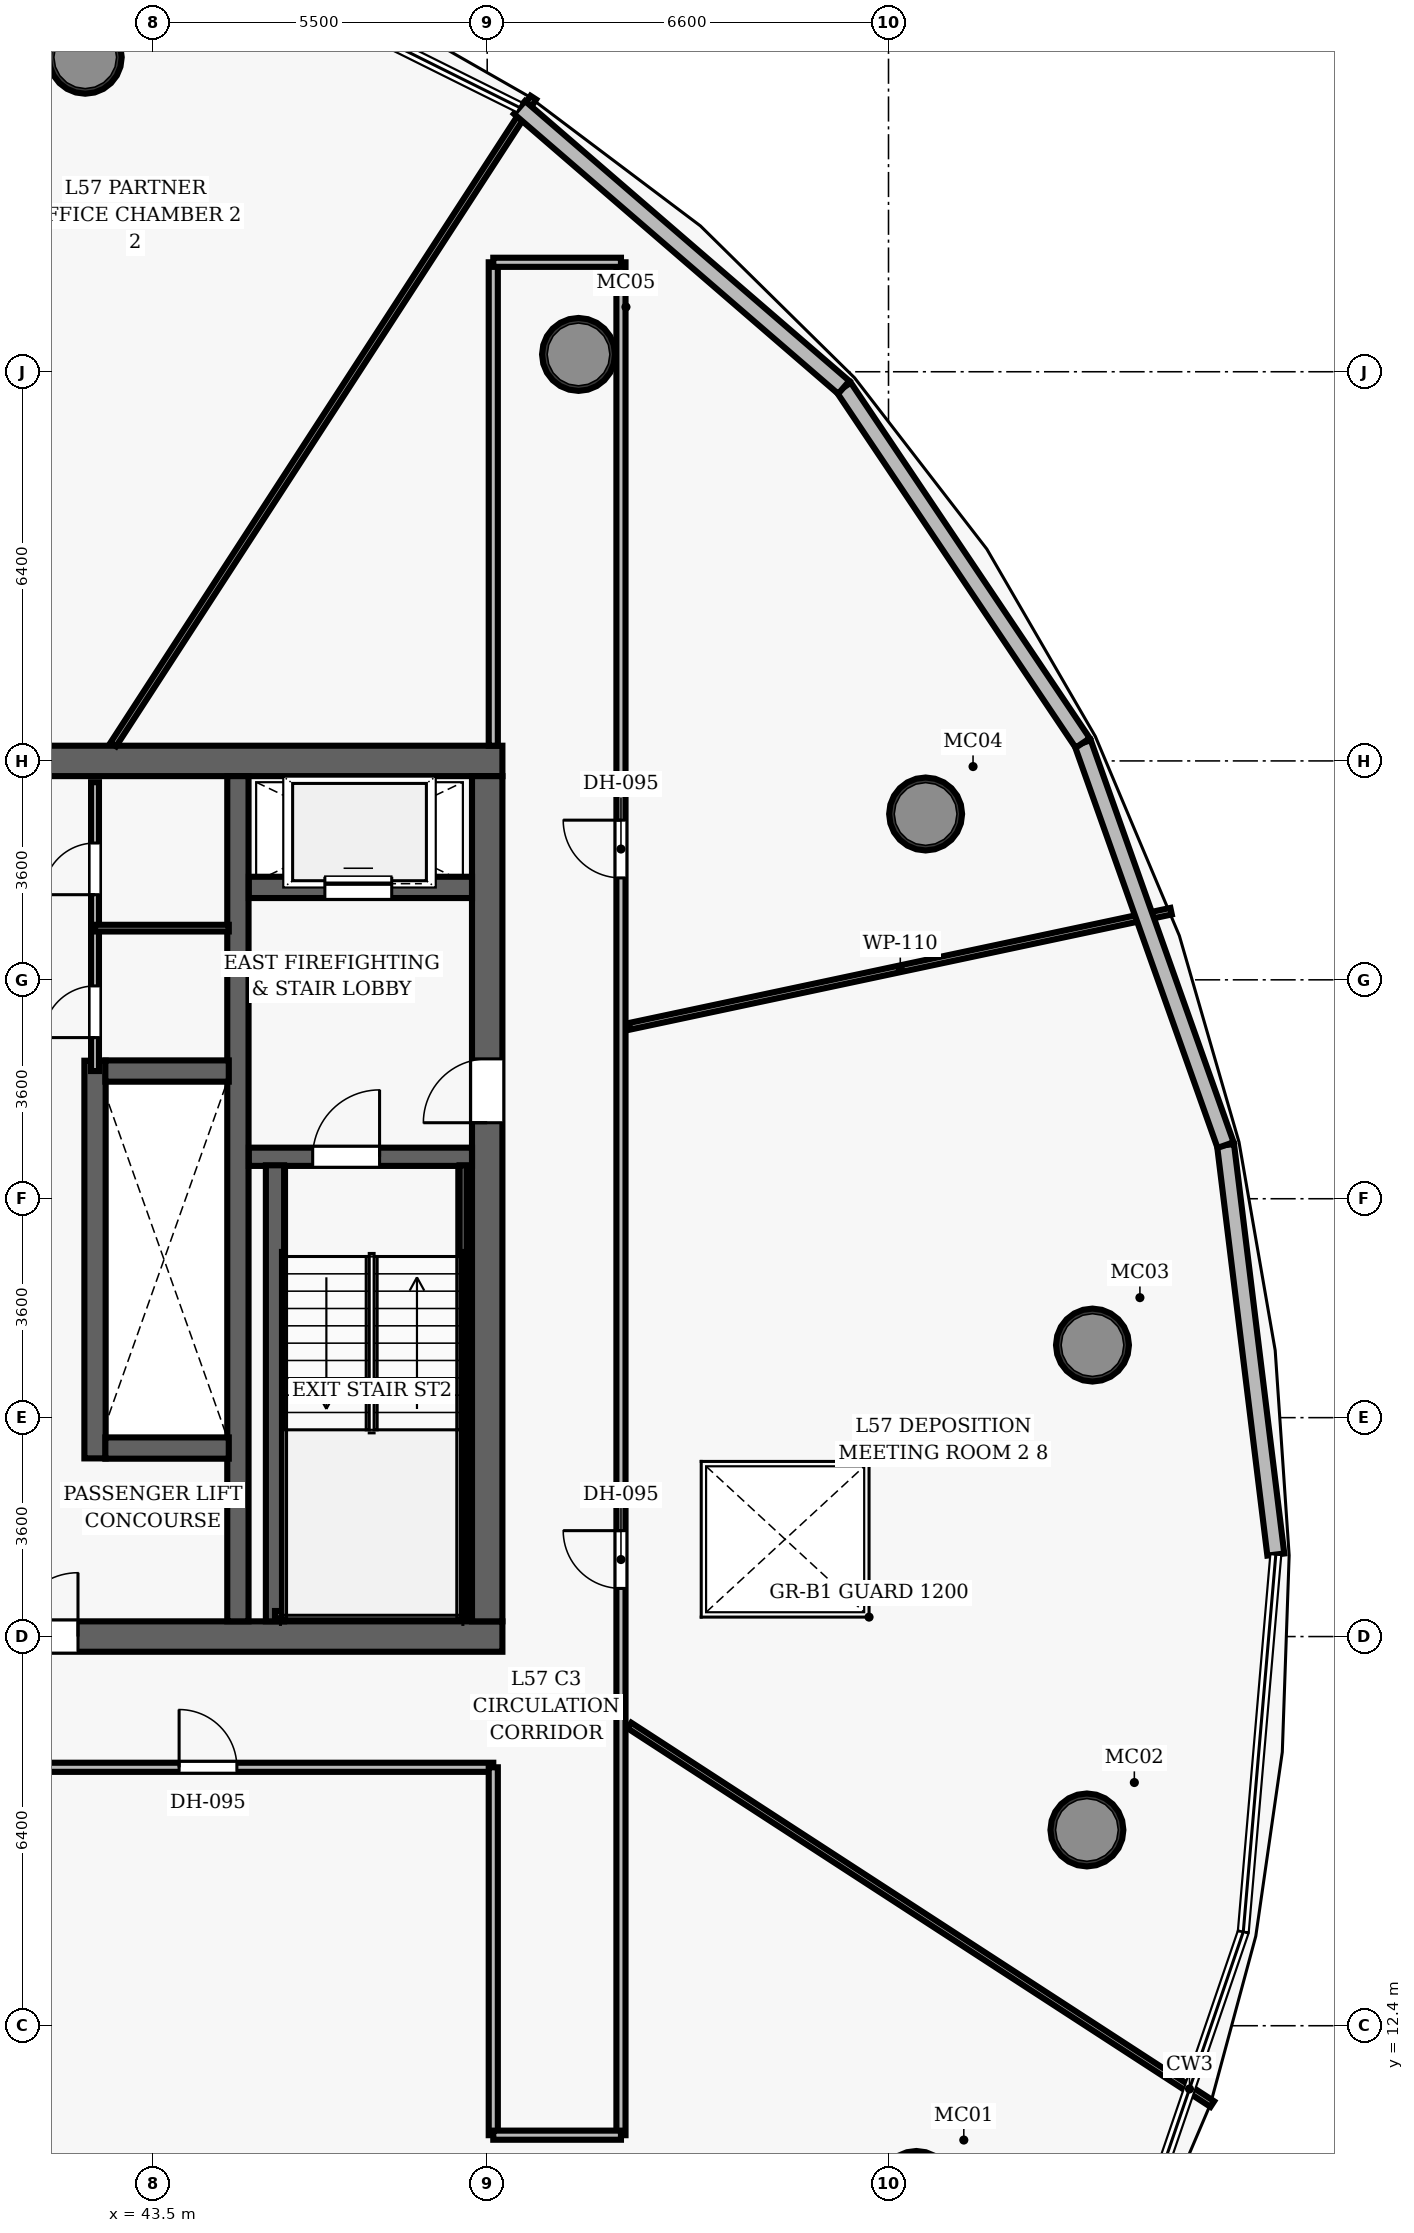
"""IFC4 building model, lengths in metres.
Left out: names, types, materials, properties, quantities, classifications, styles, units other than length and angle.
Written with IfcOpenShell. Run it as: python <this file> out.ifc"""

import sys

from ifc_helpers import new_model, si_unit, direction, frame, frame_2d, origin, origin_2d, place, context, subcontext, project, spatial, rectangle, hollow_circle, extrude, element, fill, save


model = new_model("IFC4")
c1 = context("Model", 3, precision=1e-05, world=origin(), true_north=direction((0.0, 1.0)))
c2 = subcontext(c1, "Body", "Model", "MODEL_VIEW")
j1 = project(units=[si_unit("LENGTHUNIT", "METRE"), si_unit("PLANEANGLEUNIT", "RADIAN")], contexts=[c1])
p1 = place(None, origin())
s1 = spatial("IfcSite", under=j1, at=p1, CompositionType="ELEMENT")
p2 = place(p1, origin())
s2 = spatial("IfcBuilding", under=s1, at=p2, CompositionType="ELEMENT")
p3 = place(p2, frame((0.0, 0.0, 225.1)))
s3 = spatial("IfcBuildingStorey", under=s2, at=p3, CompositionType="ELEMENT", Elevation=225.1)
p4 = place(p3, frame((26.75, 18.8, 0.0), z_axis=(0.0, 0.0, 1.0), x_axis=(1.0, 0.0, 0.0)))
e1 = element("IfcWall", 1, at=p4, inside=s3, PredefinedType="SHEAR", context=c2, shape_type="SweptSolid", body=[
    extrude(rectangle(XDim=22.5, YDim=0.5, at=frame_2d((11.25, 0.0))), origin(), (0.0, 0.0, 1.0), 3.85),
])
p5 = place(p4, frame((14.47, 0.0, 0.0)))
e2 = element("IfcOpeningElement", 2, at=p5, cuts=e1, PredefinedType="OPENING", context=c2, shape_type="SweptSolid", body=[
    extrude(rectangle(XDim=1.05, YDim=2.15, at=frame_2d((0.525, 1.075))), frame((0.0, 0.26, 0.0), z_axis=(0.0, -1.0, 0.0), x_axis=(1.0, 0.0, 0.0)), (0.0, 0.0, 1.0), 0.52),
])
p6 = place(p3, frame((26.75, 33.2, 0.0), z_axis=(0.0, 0.0, 1.0), x_axis=(1.0, 0.0, 0.0)))
e3 = element("IfcWall", 3, at=p6, inside=s3, PredefinedType="SHEAR", context=c2, shape_type="SweptSolid", body=[
    extrude(rectangle(XDim=22.5, YDim=0.5, at=frame_2d((11.25, 0.0))), origin(), (0.0, 0.0, 1.0), 3.85),
])
p7 = place(p3, frame((49.0, 19.05, 0.0), z_axis=(0.0, 0.0, 1.0), x_axis=(0.0, 1.0, 0.0)))
e4 = element("IfcWall", 4, at=p7, inside=s3, PredefinedType="SHEAR", context=c2, shape_type="SweptSolid", body=[
    extrude(rectangle(XDim=13.9, YDim=0.5, at=frame_2d((6.95, 0.0))), origin(), (0.0, 0.0, 1.0), 3.85),
])
p8 = place(p7, frame((8.2, 0.0, 0.0)))
e5 = element("IfcOpeningElement", 5, at=p8, cuts=e4, PredefinedType="OPENING", context=c2, shape_type="SweptSolid", body=[
    extrude(rectangle(XDim=1.05, YDim=2.15, at=frame_2d((0.525, 1.075))), frame((0.0, 0.26, 0.0), z_axis=(0.0, -1.0, 0.0), x_axis=(1.0, 0.0, 0.0)), (0.0, 0.0, 1.0), 0.52),
])
p9 = place(p3, frame((44.9, 19.05, 0.0), z_axis=(0.0, 0.0, 1.0), x_axis=(0.0, 1.0, 0.0)))
e6 = element("IfcWall", 6, at=p9, inside=s3, PredefinedType="SHEAR", context=c2, shape_type="SweptSolid", body=[
    extrude(rectangle(XDim=13.9, YDim=0.35, at=frame_2d((6.95, 0.0))), origin(), (0.0, 0.0, 1.0), 3.85),
])
for number, where, z_axis, x_axis in (
    (7, (56.058, 9.74, 0.0), (0.0, 0.0, 1.0), (1.0, 0.0, 0.0)),
    (8, (58.863, 15.619, 0.0), (0.0, 0.0, 1.0), (1.0, 0.0, 0.0)),
    (9, (58.955, 23.594, 0.0), (0.0, 0.0, 1.0), (1.0, 0.0, 0.0)),
    (10, (56.21, 32.327, 0.0), (0.0, 0.0, 1.0), (1.0, 0.0, 0.0)),
    (11, (50.502, 39.885, 0.0), (0.0, 0.0, 1.0), (1.0, 0.0, 0.0)),
    (12, (42.389, 44.772, 0.0), (0.0, 0.0, 1.0), (1.0, 0.0, 0.0)),
):
    element("IfcColumn", number, at=place(p3, frame(where, z_axis=z_axis, x_axis=x_axis)), inside=s3, PredefinedType="COLUMN", context=c2, shape_type="SweptSolid", body=[
        extrude(hollow_circle(Radius=0.6, WallThickness=0.05, at=origin_2d()), origin(), (0.0, 0.0, 1.0), 3.85),
    ])
p10 = place(p3, frame((45.08, 26.69, 0.0), z_axis=(0.0, 0.0, 1.0), x_axis=(1.0, 0.0, 0.0)))
e13 = element("IfcWall", 13, at=p10, inside=s3, PredefinedType="SHEAR", context=c2, shape_type="SweptSolid", body=[
    extrude(rectangle(XDim=3.67, YDim=0.3, at=frame_2d((1.835, 0.0))), origin(), (0.0, 0.0, 1.0), 3.85),
])
p11 = place(p10, frame((1.05, 0.0, 0.0)))
e14 = element("IfcOpeningElement", 14, at=p11, cuts=e13, PredefinedType="OPENING", context=c2, shape_type="SweptSolid", body=[
    extrude(rectangle(XDim=1.1, YDim=2.15, at=frame_2d((0.55, 1.075))), frame((0.0, 0.16, 0.0), z_axis=(0.0, -1.0, 0.0), x_axis=(1.0, 0.0, 0.0)), (0.0, 0.0, 1.0), 0.32),
])
p12 = place(p3, frame((45.51, 19.05, 0.0), z_axis=(0.0, 0.0, 1.0), x_axis=(0.0, 1.0, 0.0)))
e15 = element("IfcWall", 15, at=p12, inside=s3, PredefinedType="SHEAR", context=c2, shape_type="SweptSolid", body=[
    extrude(rectangle(XDim=7.5, YDim=0.3, at=frame_2d((3.75, 0.0))), origin(), (0.0, 0.0, 1.0), 3.85),
])
p13 = place(p3, frame((48.605, 19.1, 0.0), z_axis=(0.0, 0.0, 1.0), x_axis=(0.0, 1.0, 0.0)))
e16 = element("IfcWall", 16, at=p13, inside=s3, PredefinedType="SHEAR", context=c2, shape_type="SweptSolid", body=[
    extrude(rectangle(XDim=7.45, YDim=0.12, at=frame_2d((3.725, 0.0))), origin(), (0.0, 0.0, 1.0), 3.85),
])
p14 = place(p3, frame((45.51, 19.16, 0.0), z_axis=(0.0, 0.0, 1.0), x_axis=(1.0, 0.0, 0.0)))
e17 = element("IfcWall", 17, at=p14, inside=s3, PredefinedType="SHEAR", context=c2, shape_type="SweptSolid", body=[
    extrude(rectangle(XDim=3.095, YDim=0.12, at=frame_2d((1.547, 0.0))), origin(), (0.0, 0.0, 1.0), 3.85),
])
p15 = place(p3, frame((45.08, 31.12, 0.0), z_axis=(0.0, 0.0, 1.0), x_axis=(1.0, 0.0, 0.0)))
e18 = element("IfcWall", 18, at=p15, inside=s3, PredefinedType="SHEAR", context=c2, shape_type="SweptSolid", body=[
    extrude(rectangle(XDim=3.67, YDim=0.35, at=frame_2d((1.835, 0.0))), origin(), (0.0, 0.0, 1.0), 3.035),
])
p16 = place(p15, frame((1.25, 0.0, 0.0)))
e19 = element("IfcOpeningElement", 19, at=p16, cuts=e18, PredefinedType="OPENING", context=c2, shape_type="SweptSolid", body=[
    extrude(rectangle(XDim=1.1, YDim=2.15, at=frame_2d((0.55, 1.075))), frame((0.0, 0.185, 0.0), z_axis=(0.0, -1.0, 0.0), x_axis=(1.0, 0.0, 0.0)), (0.0, 0.0, 1.0), 0.37),
])
p17 = place(p3, frame((42.55, 21.73, 0.0), z_axis=(0.0, 0.0, 1.0), x_axis=(0.0, 1.0, 0.0)))
e20 = element("IfcWall", 20, at=p17, inside=s3, PredefinedType="SHEAR", context=c2, shape_type="SweptSolid", body=[
    extrude(rectangle(XDim=6.54, YDim=0.35, at=frame_2d((3.27, 0.0))), origin(), (0.0, 0.0, 1.0), 3.035),
])
for number, where, z_axis, x_axis in (
    (21, (42.72, 21.9, 0.0), (0.0, 0.0, 1.0), (1.0, 0.0, 0.0)),
    (22, (42.72, 28.1, 0.0), (0.0, 0.0, 1.0), (1.0, 0.0, 0.0)),
):
    element("IfcWall", number, at=place(p3, frame(where, z_axis=z_axis, x_axis=x_axis)), inside=s3, PredefinedType="SHEAR", context=c2, shape_type="SweptSolid", body=[
        extrude(rectangle(XDim=2.03, YDim=0.35, at=frame_2d((1.015, 0.0))), origin(), (0.0, 0.0, 1.0), 3.035),
    ])
p18 = place(p3, frame((42.55, 28.1, 0.0), z_axis=(0.0, 0.0, 1.0), x_axis=(0.0, 1.0, 0.0)))
e23 = element("IfcWall", 23, at=p18, inside=s3, PredefinedType="PARTITIONING", context=c2, shape_type="SweptSolid", body=[
    extrude(rectangle(XDim=4.75, YDim=0.13, at=frame_2d((2.375, 0.0))), origin(), (0.0, 0.0, 1.0), 3.035),
])
p19 = place(p18, frame((0.55, 0.0, 0.0)))
e24 = element("IfcOpeningElement", 24, at=p19, cuts=e23, PredefinedType="OPENING", context=c2, shape_type="SweptSolid", body=[
    extrude(rectangle(XDim=0.85, YDim=2.1, at=frame_2d((0.425, 1.05))), frame((0.0, 0.075, 0.0), z_axis=(0.0, -1.0, 0.0), x_axis=(1.0, 0.0, 0.0)), (0.0, 0.0, 1.0), 0.15),
])
p20 = place(p18, frame((2.9, 0.0, 0.0)))
e25 = element("IfcOpeningElement", 25, at=p20, cuts=e23, PredefinedType="OPENING", context=c2, shape_type="SweptSolid", body=[
    extrude(rectangle(XDim=0.85, YDim=2.1, at=frame_2d((0.425, 1.05))), frame((0.0, 0.075, 0.0), z_axis=(0.0, -1.0, 0.0), x_axis=(1.0, 0.0, 0.0)), (0.0, 0.0, 1.0), 0.15),
])
p21 = place(p3, frame((42.55, 30.45, 0.0), z_axis=(0.0, 0.0, 1.0), x_axis=(1.0, 0.0, 0.0)))
e26 = element("IfcWall", 26, at=p21, inside=s3, PredefinedType="PARTITIONING", context=c2, shape_type="SweptSolid", body=[
    extrude(rectangle(XDim=2.2, YDim=0.11, at=frame_2d((1.1, 0.0))), origin(), (0.0, 0.0, 1.0), 3.035),
])
p22 = place(p3, frame((26.9, 16.65, 0.0), z_axis=(0.0, 0.0, 1.0), x_axis=(1.0, 0.0, 0.0)))
e27 = element("IfcWall", 27, at=p22, inside=s3, PredefinedType="PARTITIONING", context=c2, shape_type="SweptSolid", body=[
    extrude(rectangle(XDim=22.2, YDim=0.15, at=frame_2d((11.1, 0.0))), origin(), (0.0, 0.0, 1.0), 3.035),
])
p23 = place(p22, frame((10.744, 0.0, 0.0)))
e28 = element("IfcOpeningElement", 28, at=p23, cuts=e27, PredefinedType="OPENING", context=c2, shape_type="SweptSolid", body=[
    extrude(rectangle(XDim=0.95, YDim=2.15, at=frame_2d((0.475, 1.075))), frame((0.0, 0.085, 0.0), z_axis=(0.0, -1.0, 0.0), x_axis=(1.0, 0.0, 0.0)), (0.0, 0.0, 1.0), 0.17),
])
p24 = place(p22, frame((17.033, 0.0, 0.0)))
e29 = element("IfcOpeningElement", 29, at=p24, cuts=e27, PredefinedType="OPENING", context=c2, shape_type="SweptSolid", body=[
    extrude(rectangle(XDim=0.95, YDim=2.15, at=frame_2d((0.475, 1.075))), frame((0.0, 0.085, 0.0), z_axis=(0.0, -1.0, 0.0), x_axis=(1.0, 0.0, 0.0)), (0.0, 0.0, 1.0), 0.17),
])
p25 = place(p3, frame((51.2, 10.6, 0.0), z_axis=(0.0, 0.0, 1.0), x_axis=(0.0, 1.0, 0.0)))
e30 = element("IfcWall", 30, at=p25, inside=s3, PredefinedType="PARTITIONING", context=c2, shape_type="SweptSolid", body=[
    extrude(rectangle(XDim=30.8, YDim=0.15, at=frame_2d((15.4, 0.0))), origin(), (0.0, 0.0, 1.0), 3.035),
])
p26 = place(p25, frame((20.676, 0.0, 0.0)))
e31 = element("IfcOpeningElement", 31, at=p26, cuts=e30, PredefinedType="OPENING", context=c2, shape_type="SweptSolid", body=[
    extrude(rectangle(XDim=0.95, YDim=2.15, at=frame_2d((0.475, 1.075))), frame((0.0, 0.085, 0.0), z_axis=(0.0, -1.0, 0.0), x_axis=(1.0, 0.0, 0.0)), (0.0, 0.0, 1.0), 0.17),
])
p27 = place(p25, frame((8.992, 0.0, 0.0)))
e32 = element("IfcOpeningElement", 32, at=p27, cuts=e30, PredefinedType="OPENING", context=c2, shape_type="SweptSolid", body=[
    extrude(rectangle(XDim=0.95, YDim=2.15, at=frame_2d((0.475, 1.075))), frame((0.0, 0.085, 0.0), z_axis=(0.0, -1.0, 0.0), x_axis=(1.0, 0.0, 0.0)), (0.0, 0.0, 1.0), 0.17),
])
p28 = place(p3, frame((49.1, 10.6, 0.0), z_axis=(0.0, 0.0, 1.0), x_axis=(0.0, 1.0, 0.0)))
e33 = element("IfcWall", 33, at=p28, inside=s3, PredefinedType="PARTITIONING", context=c2, shape_type="SweptSolid", body=[
    extrude(rectangle(XDim=6.05, YDim=0.15, at=frame_2d((3.025, 0.0))), origin(), (0.0, 0.0, 1.0), 3.035),
])
p29 = place(p3, frame((49.1, 33.45, 0.0), z_axis=(0.0, 0.0, 1.0), x_axis=(0.0, 1.0, 0.0)))
e34 = element("IfcWall", 34, at=p29, inside=s3, PredefinedType="PARTITIONING", context=c2, shape_type="SweptSolid", body=[
    extrude(rectangle(XDim=7.95, YDim=0.15, at=frame_2d((3.975, 0.0))), origin(), (0.0, 0.0, 1.0), 3.035),
])
for number, where, z_axis, x_axis in (
    (35, (49.1, 10.6, 0.0), (0.0, 0.0, 1.0), (1.0, 0.0, 0.0)),
    (36, (49.1, 41.4, 0.0), (0.0, 0.0, 1.0), (1.0, 0.0, 0.0)),
):
    element("IfcWall", number, at=place(p3, frame(where, z_axis=z_axis, x_axis=x_axis)), inside=s3, PredefinedType="PARTITIONING", context=c2, shape_type="SweptSolid", body=[
        extrude(rectangle(XDim=2.1, YDim=0.15, at=frame_2d((1.05, 0.0))), origin(), (0.0, 0.0, 1.0), 3.035),
    ])
p30 = place(p3, frame((51.34, 28.835, 0.0), z_axis=(0.0, 0.0, 1.0), x_axis=(0.978143995196, 0.207928652819, 0.0)))
e37 = element("IfcWall", 37, at=p30, inside=s3, PredefinedType="PARTITIONING", context=c2, shape_type="SweptSolid", body=[
    extrude(rectangle(XDim=9.107, YDim=0.11, at=frame_2d((4.553, 0.0))), origin(), (0.0, 0.0, 1.0), 3.035),
])
p31 = place(p3, frame((42.851, 33.47, 0.0), z_axis=(0.0, 0.0, 1.0), x_axis=(0.544639202203, 0.838670459372, 0.0)))
e38 = element("IfcWall", 38, at=p31, inside=s3, PredefinedType="PARTITIONING", context=c2, shape_type="SweptSolid", body=[
    extrude(rectangle(XDim=12.684, YDim=0.11, at=frame_2d((6.342, 0.0))), origin(), (0.0, 0.0, 1.0), 3.035),
])
p32 = place(p3, frame((40.017, 16.51, 0.0), z_axis=(0.0, 0.0, 1.0), x_axis=(0.207916198269, -0.978146642635, 0.0)))
e39 = element("IfcWall", 39, at=p32, inside=s3, PredefinedType="PARTITIONING", context=c2, shape_type="SweptSolid", body=[
    extrude(rectangle(XDim=15.809, YDim=0.11, at=frame_2d((7.904, 0.0))), origin(), (0.0, 0.0, 1.0), 3.035),
])
p33 = place(p3, frame((51.34, 17.337, 0.0), z_axis=(0.0, 0.0, 1.0), x_axis=(0.838670967245, -0.544638420148, 0.0)))
e40 = element("IfcWall", 40, at=p33, inside=s3, PredefinedType="PARTITIONING", context=c2, shape_type="SweptSolid", body=[
    extrude(rectangle(XDim=11.429, YDim=0.11, at=frame_2d((5.715, 0.0))), origin(), (0.0, 0.0, 1.0), 3.035),
])
p34 = place(p3, frame((61.143, 26.882, 0.0), z_axis=(0.0, 0.0, 1.0), x_axis=(0.121811070165, -0.992553304959, 0.0)))
e41 = element("IfcWall", 41, at=p34, inside=s3, PredefinedType="SOLIDWALL", context=c2, shape_type="SweptSolid", body=[
    extrude(rectangle(XDim=6.784, YDim=0.28, at=frame_2d((3.392, 0.0))), origin(), (0.0, 0.0, 1.0), 3.62),
])
p35 = place(p3, frame((58.794, 33.495, 0.0), z_axis=(0.0, 0.0, 1.0), x_axis=(0.334775620093, -0.942297874449, 0.0)))
e42 = element("IfcWall", 42, at=p35, inside=s3, PredefinedType="SOLIDWALL", context=c2, shape_type="SweptSolid", body=[
    extrude(rectangle(XDim=7.018, YDim=0.28, at=frame_2d((3.509, 0.0))), origin(), (0.0, 0.0, 1.0), 3.62),
])
p36 = place(p3, frame((54.864, 39.343, 0.0), z_axis=(0.0, 0.0, 1.0), x_axis=(0.557791037404, -0.829981420631, 0.0)))
e43 = element("IfcWall", 43, at=p36, inside=s3, PredefinedType="SOLIDWALL", context=c2, shape_type="SweptSolid", body=[
    extrude(rectangle(XDim=7.045, YDim=0.28, at=frame_2d((3.523, 0.0))), origin(), (0.0, 0.0, 1.0), 3.62),
])
p37 = place(p3, frame((49.531, 43.947, 0.0), z_axis=(0.0, 0.0, 1.0), x_axis=(0.756962457783, -0.65345836708, 0.0)))
e44 = element("IfcWall", 44, at=p37, inside=s3, PredefinedType="SOLIDWALL", context=c2, shape_type="SweptSolid", body=[
    extrude(rectangle(XDim=7.046, YDim=0.28, at=frame_2d((3.523, 0.0))), origin(), (0.0, 0.0, 1.0), 3.62),
])
p38 = place(p11, origin())
e45 = element("IfcDoor", 45, at=p38, inside=s3, OperationType="SINGLE_SWING_RIGHT", PredefinedType="DOOR", context=c2, shape_type="SweptSolid", body=[
    extrude(rectangle(XDim=1.1, YDim=2.15, at=frame_2d((0.55, 1.075))), frame((0.0, 0.025, 0.0), z_axis=(0.0, -1.0, 0.0), x_axis=(1.0, 0.0, 0.0)), (0.0, 0.0, 1.0), 0.05),
])
fill(e14, e45)
p39 = place(p8, origin())
e46 = element("IfcDoor", 46, at=p39, inside=s3, OperationType="SINGLE_SWING_LEFT", PredefinedType="DOOR", context=c2, shape_type="SweptSolid", body=[
    extrude(rectangle(XDim=1.05, YDim=2.15, at=frame_2d((0.525, 1.075))), frame((0.0, 0.025, 0.0), z_axis=(0.0, -1.0, 0.0), x_axis=(1.0, 0.0, 0.0)), (0.0, 0.0, 1.0), 0.05),
])
fill(e5, e46)
p40 = place(p5, origin())
e47 = element("IfcDoor", 47, at=p40, inside=s3, OperationType="SINGLE_SWING_RIGHT", PredefinedType="DOOR", context=c2, shape_type="SweptSolid", body=[
    extrude(rectangle(XDim=1.05, YDim=2.15, at=frame_2d((0.525, 1.075))), frame((0.0, 0.025, 0.0), z_axis=(0.0, -1.0, 0.0), x_axis=(1.0, 0.0, 0.0)), (0.0, 0.0, 1.0), 0.05),
])
fill(e2, e47)
p41 = place(p19, origin())
e48 = element("IfcDoor", 48, at=p41, inside=s3, OperationType="SINGLE_SWING_LEFT", PredefinedType="DOOR", context=c2, shape_type="SweptSolid", body=[
    extrude(rectangle(XDim=0.85, YDim=2.1, at=frame_2d((0.425, 1.05))), frame((0.0, 0.025, 0.0), z_axis=(0.0, -1.0, 0.0), x_axis=(1.0, 0.0, 0.0)), (0.0, 0.0, 1.0), 0.05),
])
fill(e24, e48)
p42 = place(p20, origin())
e49 = element("IfcDoor", 49, at=p42, inside=s3, OperationType="SINGLE_SWING_LEFT", PredefinedType="DOOR", context=c2, shape_type="SweptSolid", body=[
    extrude(rectangle(XDim=0.85, YDim=2.1, at=frame_2d((0.425, 1.05))), frame((0.0, 0.025, 0.0), z_axis=(0.0, -1.0, 0.0), x_axis=(1.0, 0.0, 0.0)), (0.0, 0.0, 1.0), 0.05),
])
fill(e25, e49)
p43 = place(p26, origin())
e50 = element("IfcDoor", 50, at=p43, inside=s3, OperationType="SINGLE_SWING_RIGHT", PredefinedType="DOOR", context=c2, shape_type="SweptSolid", body=[
    extrude(rectangle(XDim=0.95, YDim=2.15, at=frame_2d((0.475, 1.075))), frame((0.0, 0.025, 0.0), z_axis=(0.0, -1.0, 0.0), x_axis=(1.0, 0.0, 0.0)), (0.0, 0.0, 1.0), 0.05),
])
fill(e31, e50)
p44 = place(p24, origin())
e51 = element("IfcDoor", 51, at=p44, inside=s3, OperationType="SINGLE_SWING_LEFT", PredefinedType="DOOR", context=c2, shape_type="SweptSolid", body=[
    extrude(rectangle(XDim=0.95, YDim=2.15, at=frame_2d((0.475, 1.075))), frame((0.0, 0.025, 0.0), z_axis=(0.0, -1.0, 0.0), x_axis=(1.0, 0.0, 0.0)), (0.0, 0.0, 1.0), 0.05),
])
fill(e29, e51)
p45 = place(p27, origin())
e52 = element("IfcDoor", 52, at=p45, inside=s3, OperationType="SINGLE_SWING_RIGHT", PredefinedType="DOOR", context=c2, shape_type="SweptSolid", body=[
    extrude(rectangle(XDim=0.95, YDim=2.15, at=frame_2d((0.475, 1.075))), frame((0.0, 0.025, 0.0), z_axis=(0.0, -1.0, 0.0), x_axis=(1.0, 0.0, 0.0)), (0.0, 0.0, 1.0), 0.05),
])
fill(e32, e52)
p46 = place(p16, origin())
e53 = element("IfcDoor", 53, at=p46, inside=s3, OperationType="SLIDING_TO_LEFT", PredefinedType="DOOR", context=c2, shape_type="SweptSolid", body=[
    extrude(rectangle(XDim=1.1, YDim=2.15, at=frame_2d((0.55, 1.075))), frame((0.0, 0.025, 0.0), z_axis=(0.0, -1.0, 0.0), x_axis=(1.0, 0.0, 0.0)), (0.0, 0.0, 1.0), 0.05),
])
fill(e19, e53)
save(model, sys.argv[1])
